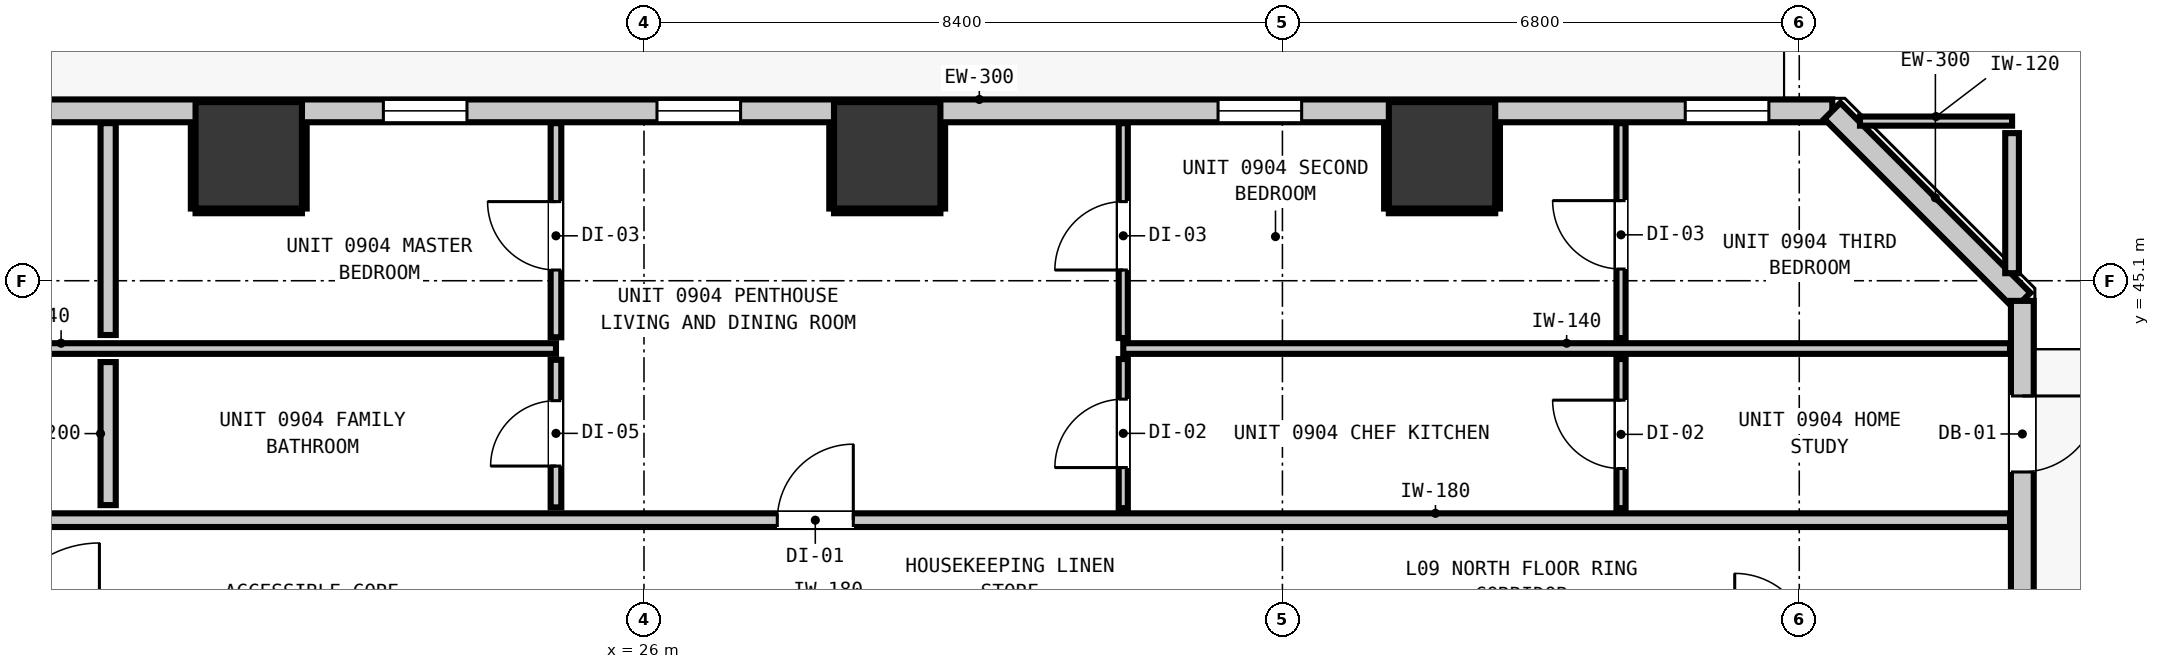
"""IFC4 building model, lengths in metres.
Left out: names, types, materials, properties, quantities, classifications, styles, units other than length and angle.
Written with IfcOpenShell. Run it as: python <this file> out.ifc"""

import sys

from ifc_helpers import new_model, si_unit, direction, frame, frame_2d, origin, origin_2d, place, context, subcontext, project, spatial, rectangle, extrude, element, fill, save


model = new_model("IFC4")
c1 = context("Model", 3, precision=1e-05, world=origin(), true_north=direction((0.0, 1.0)))
c2 = subcontext(c1, "Body", "Model", "MODEL_VIEW")
j1 = project(units=[si_unit("LENGTHUNIT", "METRE"), si_unit("PLANEANGLEUNIT", "RADIAN")], contexts=[c1])
p1 = place(None, origin())
s1 = spatial("IfcSite", under=j1, at=p1, CompositionType="ELEMENT")
p2 = place(p1, origin())
s2 = spatial("IfcBuilding", under=s1, at=p2, CompositionType="ELEMENT")
p3 = place(p2, frame((0.0, 0.0, 35.28)))
s3 = spatial("IfcBuildingStorey", under=s2, at=p3, CompositionType="ELEMENT", Elevation=35.28)
for number, where, z_axis, x_axis in (
    (1, (20.8, 46.75, 0.0), (0.0, 0.0, 1.0), (1.0, 0.0, 0.0)),
    (2, (29.2, 46.75, 0.0), (0.0, 0.0, 1.0), (1.0, 0.0, 0.0)),
    (3, (36.5, 46.75, 0.0), (0.0, 0.0, 1.0), (1.0, 0.0, 0.0)),
):
    element("IfcColumn", number, at=place(p3, frame(where, z_axis=z_axis, x_axis=x_axis)), inside=s3, PredefinedType="COLUMN", context=c2, shape_type="SweptSolid", body=[
        extrude(rectangle(XDim=1.4, YDim=1.4, at=origin_2d()), origin(), (0.0, 0.0, 1.0), 3.32),
    ])
p4 = place(p3, frame((4.165, 47.335, 0.0), z_axis=(0.0, 0.0, 1.0), x_axis=(1.0, 0.0, 0.0)))
e4 = element("IfcWall", 4, at=p4, inside=s3, PredefinedType="STANDARD", context=c2, shape_type="SweptSolid", body=[
    extrude(rectangle(XDim=37.47, YDim=0.3, at=frame_2d((18.735, 0.0))), origin(), (0.0, 0.0, 1.0), 3.06),
])
p5 = place(p4, frame((0.901, 0.0, 0.0)))
e5 = element("IfcOpeningElement", 5, at=p5, cuts=e4, PredefinedType="OPENING", context=c2, shape_type="SweptSolid", body=[
    extrude(rectangle(XDim=1.0, YDim=2.15, at=frame_2d((0.5, 1.075))), frame((0.0, 0.16, 0.0), z_axis=(0.0, -1.0, 0.0), x_axis=(1.0, 0.0, 0.0)), (0.0, 0.0, 1.0), 0.32),
])
p6 = place(p4, frame((4.693, 0.0, 0.85)))
e6 = element("IfcOpeningElement", 6, at=p6, cuts=e4, PredefinedType="OPENING", context=c2, shape_type="SweptSolid", body=[
    extrude(rectangle(XDim=1.1, YDim=2.05, at=frame_2d((0.55, 1.025))), frame((0.0, 0.16, 0.0), z_axis=(0.0, -1.0, 0.0), x_axis=(1.0, 0.0, 0.0)), (0.0, 0.0, 1.0), 0.32),
])
p7 = place(p4, frame((11.845, 0.0, 0.85)))
e7 = element("IfcOpeningElement", 7, at=p7, cuts=e4, PredefinedType="OPENING", context=c2, shape_type="SweptSolid", body=[
    extrude(rectangle(XDim=1.1, YDim=2.05, at=frame_2d((0.55, 1.025))), frame((0.0, 0.16, 0.0), z_axis=(0.0, -1.0, 0.0), x_axis=(1.0, 0.0, 0.0)), (0.0, 0.0, 1.0), 0.32),
])
p8 = place(p4, frame((22.006, 0.0, 0.85)))
e8 = element("IfcOpeningElement", 8, at=p8, cuts=e4, PredefinedType="OPENING", context=c2, shape_type="SweptSolid", body=[
    extrude(rectangle(XDim=1.1, YDim=2.05, at=frame_2d((0.55, 1.025))), frame((0.0, 0.16, 0.0), z_axis=(0.0, -1.0, 0.0), x_axis=(1.0, 0.0, 0.0)), (0.0, 0.0, 1.0), 0.32),
])
p9 = place(p4, frame((18.406, 0.0, 0.85)))
e9 = element("IfcOpeningElement", 9, at=p9, cuts=e4, PredefinedType="OPENING", context=c2, shape_type="SweptSolid", body=[
    extrude(rectangle(XDim=1.1, YDim=2.05, at=frame_2d((0.55, 1.025))), frame((0.0, 0.16, 0.0), z_axis=(0.0, -1.0, 0.0), x_axis=(1.0, 0.0, 0.0)), (0.0, 0.0, 1.0), 0.32),
])
p10 = place(p4, frame((29.388, 0.0, 0.85)))
e10 = element("IfcOpeningElement", 10, at=p10, cuts=e4, PredefinedType="OPENING", context=c2, shape_type="SweptSolid", body=[
    extrude(rectangle(XDim=1.1, YDim=2.05, at=frame_2d((0.55, 1.025))), frame((0.0, 0.16, 0.0), z_axis=(0.0, -1.0, 0.0), x_axis=(1.0, 0.0, 0.0)), (0.0, 0.0, 1.0), 0.32),
])
p11 = place(p4, frame((35.535, 0.0, 0.85)))
e11 = element("IfcOpeningElement", 11, at=p11, cuts=e4, PredefinedType="OPENING", context=c2, shape_type="SweptSolid", body=[
    extrude(rectangle(XDim=1.1, YDim=2.05, at=frame_2d((0.55, 1.025))), frame((0.0, 0.16, 0.0), z_axis=(0.0, -1.0, 0.0), x_axis=(1.0, 0.0, 0.0)), (0.0, 0.0, 1.0), 0.32),
])
p12 = place(p3, frame((41.635, 47.335, 0.0), z_axis=(0.0, 0.0, 1.0), x_axis=(0.707106781187, -0.707106781187, 0.0)))
e12 = element("IfcWall", 12, at=p12, inside=s3, PredefinedType="STANDARD", context=c2, shape_type="SweptSolid", body=[
    extrude(rectangle(XDim=3.536, YDim=0.3, at=frame_2d((1.768, 0.0))), origin(), (0.0, 0.0, 1.0), 3.06),
])
p13 = place(p3, frame((44.135, 44.835, 0.0), z_axis=(0.0, 0.0, 1.0), x_axis=(0.0, -1.0, 0.0)))
e13 = element("IfcWall", 13, at=p13, inside=s3, PredefinedType="STANDARD", context=c2, shape_type="SweptSolid", body=[
    extrude(rectangle(XDim=34.67, YDim=0.3, at=frame_2d((17.335, 0.0))), origin(), (0.0, 0.0, 1.0), 3.06),
])
p14 = place(p13, frame((1.251, 0.0, 0.0)))
e14 = element("IfcOpeningElement", 14, at=p14, cuts=e13, PredefinedType="OPENING", context=c2, shape_type="SweptSolid", body=[
    extrude(rectangle(XDim=1.0, YDim=2.15, at=frame_2d((0.5, 1.075))), frame((0.0, 0.16, 0.0), z_axis=(0.0, -1.0, 0.0), x_axis=(1.0, 0.0, 0.0)), (0.0, 0.0, 1.0), 0.32),
])
p15 = place(p13, frame((32.708, 0.0, 0.85)))
e15 = element("IfcOpeningElement", 15, at=p15, cuts=e13, PredefinedType="OPENING", context=c2, shape_type="SweptSolid", body=[
    extrude(rectangle(XDim=1.1, YDim=2.05, at=frame_2d((0.55, 1.025))), frame((0.0, 0.16, 0.0), z_axis=(0.0, -1.0, 0.0), x_axis=(1.0, 0.0, 0.0)), (0.0, 0.0, 1.0), 0.32),
])
p16 = place(p13, frame((17.935, 0.0, 0.85)))
e16 = element("IfcOpeningElement", 16, at=p16, cuts=e13, PredefinedType="OPENING", context=c2, shape_type="SweptSolid", body=[
    extrude(rectangle(XDim=1.1, YDim=2.05, at=frame_2d((0.55, 1.025))), frame((0.0, 0.16, 0.0), z_axis=(0.0, -1.0, 0.0), x_axis=(1.0, 0.0, 0.0)), (0.0, 0.0, 1.0), 0.32),
])
p17 = place(p13, frame((6.959, 0.0, 0.85)))
e17 = element("IfcOpeningElement", 17, at=p17, cuts=e13, PredefinedType="OPENING", context=c2, shape_type="SweptSolid", body=[
    extrude(rectangle(XDim=1.1, YDim=2.05, at=frame_2d((0.55, 1.025))), frame((0.0, 0.16, 0.0), z_axis=(0.0, -1.0, 0.0), x_axis=(1.0, 0.0, 0.0)), (0.0, 0.0, 1.0), 0.32),
])
p18 = place(p3, frame((12.989, 41.95, 0.0), z_axis=(0.0, 0.0, 1.0), x_axis=(1.0, 0.0, 0.0)))
e18 = element("IfcWall", 18, at=p18, inside=s3, PredefinedType="PARTITIONING", context=c2, shape_type="SweptSolid", body=[
    extrude(rectangle(XDim=30.984, YDim=0.18, at=frame_2d((15.492, 0.0))), origin(), (0.0, 0.0, 1.0), 3.06),
])
p19 = place(p18, frame((14.765, 0.0, 0.0)))
e19 = element("IfcOpeningElement", 19, at=p19, cuts=e18, PredefinedType="OPENING", context=c2, shape_type="SweptSolid", body=[
    extrude(rectangle(XDim=1.0, YDim=2.15, at=frame_2d((0.5, 1.075))), frame((0.0, 0.1, 0.0), z_axis=(0.0, -1.0, 0.0), x_axis=(1.0, 0.0, 0.0)), (0.0, 0.0, 1.0), 0.2),
])
p20 = place(p3, frame((11.82, 44.208, 0.0), z_axis=(0.0, 0.0, 1.0), x_axis=(1.0, 0.0, 0.0)))
e20 = element("IfcWall", 20, at=p20, inside=s3, PredefinedType="PARTITIONING", context=c2, shape_type="SweptSolid", body=[
    extrude(rectangle(XDim=13.022, YDim=0.14, at=frame_2d((6.511, 0.0))), origin(), (0.0, 0.0, 1.0), 3.06),
])
p21 = place(p3, frame((32.306, 44.208, 0.0), z_axis=(0.0, 0.0, 1.0), x_axis=(1.0, 0.0, 0.0)))
e21 = element("IfcWall", 21, at=p21, inside=s3, PredefinedType="PARTITIONING", context=c2, shape_type="SweptSolid", body=[
    extrude(rectangle(XDim=11.667, YDim=0.14, at=frame_2d((5.833, 0.0))), origin(), (0.0, 0.0, 1.0), 3.06),
])
p22 = place(p3, frame((41.999, 47.2, 0.0), z_axis=(0.0, 0.0, 1.0), x_axis=(1.0, 0.0, 0.0)))
e22 = element("IfcWall", 22, at=p22, inside=s3, PredefinedType="PARTITIONING", context=c2, shape_type="SweptSolid", body=[
    extrude(rectangle(XDim=2.001, YDim=0.12, at=frame_2d((1.0, 0.0))), origin(), (0.0, 0.0, 1.0), 3.06),
])
p23 = place(p3, frame((18.95, 42.148, 0.0), z_axis=(0.0, 0.0, 1.0), x_axis=(0.0, 1.0, 0.0)))
e23 = element("IfcWall", 23, at=p23, inside=s3, PredefinedType="PARTITIONING", context=c2, shape_type="SweptSolid", body=[
    extrude(rectangle(XDim=1.882, YDim=0.2, at=frame_2d((0.941, 0.0))), origin(), (0.0, 0.0, 1.0), 3.06),
])
p24 = place(p3, frame((18.95, 44.386, 0.0), z_axis=(0.0, 0.0, 1.0), x_axis=(0.0, 1.0, 0.0)))
e24 = element("IfcWall", 24, at=p24, inside=s3, PredefinedType="PARTITIONING", context=c2, shape_type="SweptSolid", body=[
    extrude(rectangle(XDim=2.787, YDim=0.2, at=frame_2d((1.394, 0.0))), origin(), (0.0, 0.0, 1.0), 3.06),
])
p25 = place(p3, frame((44.0, 45.199, 0.0), z_axis=(0.0, 0.0, 1.0), x_axis=(0.0, 1.0, 0.0)))
e25 = element("IfcWall", 25, at=p25, inside=s3, PredefinedType="PARTITIONING", context=c2, shape_type="SweptSolid", body=[
    extrude(rectangle(XDim=1.843, YDim=0.18, at=frame_2d((0.921, 0.0))), origin(), (0.0, 0.0, 1.0), 3.06),
])
p26 = place(p3, frame((24.842, 42.118, 0.0), z_axis=(0.0, 0.0, 1.0), x_axis=(0.0, 1.0, 0.0)))
e26 = element("IfcWall", 26, at=p26, inside=s3, PredefinedType="PARTITIONING", context=c2, shape_type="SweptSolid", body=[
    extrude(rectangle(XDim=1.942, YDim=0.14, at=frame_2d((0.971, 0.0))), origin(), (0.0, 0.0, 1.0), 3.06),
])
p27 = place(p26, frame((0.544, 0.0, 0.0)))
e27 = element("IfcOpeningElement", 27, at=p27, cuts=e26, PredefinedType="OPENING", context=c2, shape_type="SweptSolid", body=[
    extrude(rectangle(XDim=0.86, YDim=2.02, at=frame_2d((0.43, 1.01))), frame((0.0, 0.08, 0.0), z_axis=(0.0, -1.0, 0.0), x_axis=(1.0, 0.0, 0.0)), (0.0, 0.0, 1.0), 0.16),
])
p28 = place(p3, frame((24.842, 44.356, 0.0), z_axis=(0.0, 0.0, 1.0), x_axis=(0.0, 1.0, 0.0)))
e28 = element("IfcWall", 28, at=p28, inside=s3, PredefinedType="PARTITIONING", context=c2, shape_type="SweptSolid", body=[
    extrude(rectangle(XDim=2.817, YDim=0.14, at=frame_2d((1.409, 0.0))), origin(), (0.0, 0.0, 1.0), 3.06),
])
p29 = place(p28, frame((0.885, 0.0, 0.0)))
e29 = element("IfcOpeningElement", 29, at=p29, cuts=e28, PredefinedType="OPENING", context=c2, shape_type="SweptSolid", body=[
    extrude(rectangle(XDim=0.9, YDim=2.1, at=frame_2d((0.45, 1.05))), frame((0.0, 0.08, 0.0), z_axis=(0.0, -1.0, 0.0), x_axis=(1.0, 0.0, 0.0)), (0.0, 0.0, 1.0), 0.16),
])
p30 = place(p3, frame((32.306, 42.108, 0.0), z_axis=(0.0, 0.0, 1.0), x_axis=(0.0, 1.0, 0.0)))
e30 = element("IfcWall", 30, at=p30, inside=s3, PredefinedType="PARTITIONING", context=c2, shape_type="SweptSolid", body=[
    extrude(rectangle(XDim=1.962, YDim=0.12, at=frame_2d((0.981, 0.0))), origin(), (0.0, 0.0, 1.0), 3.06),
])
p31 = place(p30, frame((0.534, 0.0, 0.0)))
e31 = element("IfcOpeningElement", 31, at=p31, cuts=e30, PredefinedType="OPENING", context=c2, shape_type="SweptSolid", body=[
    extrude(rectangle(XDim=0.9, YDim=2.1, at=frame_2d((0.45, 1.05))), frame((0.0, 0.07, 0.0), z_axis=(0.0, -1.0, 0.0), x_axis=(1.0, 0.0, 0.0)), (0.0, 0.0, 1.0), 0.14),
])
p32 = place(p3, frame((32.306, 44.346, 0.0), z_axis=(0.0, 0.0, 1.0), x_axis=(0.0, 1.0, 0.0)))
e32 = element("IfcWall", 32, at=p32, inside=s3, PredefinedType="PARTITIONING", context=c2, shape_type="SweptSolid", body=[
    extrude(rectangle(XDim=2.827, YDim=0.12, at=frame_2d((1.414, 0.0))), origin(), (0.0, 0.0, 1.0), 3.06),
])
p33 = place(p32, frame((0.895, 0.0, 0.0)))
e33 = element("IfcOpeningElement", 33, at=p33, cuts=e32, PredefinedType="OPENING", context=c2, shape_type="SweptSolid", body=[
    extrude(rectangle(XDim=0.9, YDim=2.1, at=frame_2d((0.45, 1.05))), frame((0.0, 0.07, 0.0), z_axis=(0.0, -1.0, 0.0), x_axis=(1.0, 0.0, 0.0)), (0.0, 0.0, 1.0), 0.14),
])
p34 = place(p3, frame((38.855, 42.108, 0.0), z_axis=(0.0, 0.0, 1.0), x_axis=(0.0, 1.0, 0.0)))
e34 = element("IfcWall", 34, at=p34, inside=s3, PredefinedType="PARTITIONING", context=c2, shape_type="SweptSolid", body=[
    extrude(rectangle(XDim=1.962, YDim=0.12, at=frame_2d((0.981, 0.0))), origin(), (0.0, 0.0, 1.0), 3.06),
])
p35 = place(p34, frame((0.521, 0.0, 0.0)))
e35 = element("IfcOpeningElement", 35, at=p35, cuts=e34, PredefinedType="OPENING", context=c2, shape_type="SweptSolid", body=[
    extrude(rectangle(XDim=0.9, YDim=2.1, at=frame_2d((0.45, 1.05))), frame((0.0, 0.07, 0.0), z_axis=(0.0, -1.0, 0.0), x_axis=(1.0, 0.0, 0.0)), (0.0, 0.0, 1.0), 0.14),
])
p36 = place(p3, frame((38.855, 44.346, 0.0), z_axis=(0.0, 0.0, 1.0), x_axis=(0.0, 1.0, 0.0)))
e36 = element("IfcWall", 36, at=p36, inside=s3, PredefinedType="PARTITIONING", context=c2, shape_type="SweptSolid", body=[
    extrude(rectangle(XDim=2.827, YDim=0.12, at=frame_2d((1.414, 0.0))), origin(), (0.0, 0.0, 1.0), 3.06),
])
p37 = place(p36, frame((0.908, 0.0, 0.0)))
e37 = element("IfcOpeningElement", 37, at=p37, cuts=e36, PredefinedType="OPENING", context=c2, shape_type="SweptSolid", body=[
    extrude(rectangle(XDim=0.9, YDim=2.1, at=frame_2d((0.45, 1.05))), frame((0.0, 0.07, 0.0), z_axis=(0.0, -1.0, 0.0), x_axis=(1.0, 0.0, 0.0)), (0.0, 0.0, 1.0), 0.14),
])
p38 = place(p3, frame((20.1, 46.018, 0.0), z_axis=(0.0, 0.0, 1.0), x_axis=(1.0, 0.0, 0.0)))
e38 = element("IfcWall", 38, at=p38, inside=s3, PredefinedType="PARTITIONING", context=c2, shape_type="SweptSolid", body=[
    extrude(rectangle(XDim=1.4, YDim=0.06, at=frame_2d((0.7, 0.0))), origin(), (0.0, 0.0, 1.0), 1.45),
])
for number, where, z_axis, x_axis in (
    (39, (20.068, 46.05, 0.0), (0.0, 0.0, 1.0), (0.0, 1.0, 0.0)),
    (40, (21.532, 46.05, 0.0), (0.0, 0.0, 1.0), (0.0, 1.0, 0.0)),
):
    element("IfcWall", number, at=place(p3, frame(where, z_axis=z_axis, x_axis=x_axis)), inside=s3, PredefinedType="PARTITIONING", context=c2, shape_type="SweptSolid", body=[
        extrude(rectangle(XDim=1.12, YDim=0.06, at=frame_2d((0.56, 0.0))), origin(), (0.0, 0.0, 1.0), 1.45),
    ])
p39 = place(p3, frame((28.5, 46.018, 0.0), z_axis=(0.0, 0.0, 1.0), x_axis=(1.0, 0.0, 0.0)))
e41 = element("IfcWall", 41, at=p39, inside=s3, PredefinedType="PARTITIONING", context=c2, shape_type="SweptSolid", body=[
    extrude(rectangle(XDim=1.4, YDim=0.06, at=frame_2d((0.7, 0.0))), origin(), (0.0, 0.0, 1.0), 1.45),
])
for number, where, z_axis, x_axis in (
    (42, (28.468, 46.05, 0.0), (0.0, 0.0, 1.0), (0.0, 1.0, 0.0)),
    (43, (29.932, 46.05, 0.0), (0.0, 0.0, 1.0), (0.0, 1.0, 0.0)),
):
    element("IfcWall", number, at=place(p3, frame(where, z_axis=z_axis, x_axis=x_axis)), inside=s3, PredefinedType="PARTITIONING", context=c2, shape_type="SweptSolid", body=[
        extrude(rectangle(XDim=1.12, YDim=0.06, at=frame_2d((0.56, 0.0))), origin(), (0.0, 0.0, 1.0), 1.45),
    ])
p40 = place(p3, frame((35.8, 46.018, 0.0), z_axis=(0.0, 0.0, 1.0), x_axis=(1.0, 0.0, 0.0)))
e44 = element("IfcWall", 44, at=p40, inside=s3, PredefinedType="PARTITIONING", context=c2, shape_type="SweptSolid", body=[
    extrude(rectangle(XDim=1.4, YDim=0.06, at=frame_2d((0.7, 0.0))), origin(), (0.0, 0.0, 1.0), 1.45),
])
for number, where, z_axis, x_axis in (
    (45, (35.768, 46.05, 0.0), (0.0, 0.0, 1.0), (0.0, 1.0, 0.0)),
    (46, (37.232, 46.05, 0.0), (0.0, 0.0, 1.0), (0.0, 1.0, 0.0)),
):
    element("IfcWall", number, at=place(p3, frame(where, z_axis=z_axis, x_axis=x_axis)), inside=s3, PredefinedType="PARTITIONING", context=c2, shape_type="SweptSolid", body=[
        extrude(rectangle(XDim=1.12, YDim=0.06, at=frame_2d((0.56, 0.0))), origin(), (0.0, 0.0, 1.0), 1.45),
    ])
p41 = place(p14, origin())
e47 = element("IfcDoor", 47, at=p41, inside=s3, OperationType="SINGLE_SWING_LEFT", PredefinedType="DOOR", context=c2, shape_type="SweptSolid", body=[
    extrude(rectangle(XDim=1.0, YDim=2.15, at=frame_2d((0.5, 1.075))), frame((0.0, 0.025, 0.0), z_axis=(0.0, -1.0, 0.0), x_axis=(1.0, 0.0, 0.0)), (0.0, 0.0, 1.0), 0.05),
])
fill(e14, e47)
p42 = place(p8, origin())
e48 = element("IfcWindow", 48, at=p42, inside=s3, PartitioningType="SINGLE_PANEL", PredefinedType="WINDOW", context=c2, shape_type="SweptSolid", body=[
    extrude(rectangle(XDim=1.1, YDim=2.05, at=frame_2d((0.55, 1.025))), frame((0.0, 0.03, 0.0), z_axis=(0.0, -1.0, 0.0), x_axis=(1.0, 0.0, 0.0)), (0.0, 0.0, 1.0), 0.06),
])
fill(e8, e48)
p43 = place(p9, origin())
e49 = element("IfcWindow", 49, at=p43, inside=s3, PartitioningType="SINGLE_PANEL", PredefinedType="WINDOW", context=c2, shape_type="SweptSolid", body=[
    extrude(rectangle(XDim=1.1, YDim=2.05, at=frame_2d((0.55, 1.025))), frame((0.0, 0.03, 0.0), z_axis=(0.0, -1.0, 0.0), x_axis=(1.0, 0.0, 0.0)), (0.0, 0.0, 1.0), 0.06),
])
fill(e9, e49)
p44 = place(p10, origin())
e50 = element("IfcWindow", 50, at=p44, inside=s3, PartitioningType="SINGLE_PANEL", PredefinedType="WINDOW", context=c2, shape_type="SweptSolid", body=[
    extrude(rectangle(XDim=1.1, YDim=2.05, at=frame_2d((0.55, 1.025))), frame((0.0, 0.03, 0.0), z_axis=(0.0, -1.0, 0.0), x_axis=(1.0, 0.0, 0.0)), (0.0, 0.0, 1.0), 0.06),
])
fill(e10, e50)
p45 = place(p11, origin())
e51 = element("IfcWindow", 51, at=p45, inside=s3, PartitioningType="SINGLE_PANEL", PredefinedType="WINDOW", context=c2, shape_type="SweptSolid", body=[
    extrude(rectangle(XDim=1.1, YDim=2.05, at=frame_2d((0.55, 1.025))), frame((0.0, 0.03, 0.0), z_axis=(0.0, -1.0, 0.0), x_axis=(1.0, 0.0, 0.0)), (0.0, 0.0, 1.0), 0.06),
])
fill(e11, e51)
p46 = place(p19, origin())
e52 = element("IfcDoor", 52, at=p46, inside=s3, OperationType="SINGLE_SWING_RIGHT", PredefinedType="DOOR", context=c2, shape_type="SweptSolid", body=[
    extrude(rectangle(XDim=1.0, YDim=2.15, at=frame_2d((0.5, 1.075))), frame((0.0, 0.025, 0.0), z_axis=(0.0, -1.0, 0.0), x_axis=(1.0, 0.0, 0.0)), (0.0, 0.0, 1.0), 0.05),
])
fill(e19, e52)
p47 = place(p27, origin())
e53 = element("IfcDoor", 53, at=p47, inside=s3, OperationType="SINGLE_SWING_LEFT", PredefinedType="DOOR", context=c2, shape_type="SweptSolid", body=[
    extrude(rectangle(XDim=0.86, YDim=2.02, at=frame_2d((0.43, 1.01))), frame((0.0, 0.025, 0.0), z_axis=(0.0, -1.0, 0.0), x_axis=(1.0, 0.0, 0.0)), (0.0, 0.0, 1.0), 0.05),
])
fill(e27, e53)
p48 = place(p29, origin())
e54 = element("IfcDoor", 54, at=p48, inside=s3, OperationType="SINGLE_SWING_RIGHT", PredefinedType="DOOR", context=c2, shape_type="SweptSolid", body=[
    extrude(rectangle(XDim=0.9, YDim=2.1, at=frame_2d((0.45, 1.05))), frame((0.0, 0.025, 0.0), z_axis=(0.0, -1.0, 0.0), x_axis=(1.0, 0.0, 0.0)), (0.0, 0.0, 1.0), 0.05),
])
fill(e29, e54)
p49 = place(p31, origin())
e55 = element("IfcDoor", 55, at=p49, inside=s3, OperationType="SINGLE_SWING_LEFT", PredefinedType="DOOR", context=c2, shape_type="SweptSolid", body=[
    extrude(rectangle(XDim=0.9, YDim=2.1, at=frame_2d((0.45, 1.05))), frame((0.0, 0.025, 0.0), z_axis=(0.0, -1.0, 0.0), x_axis=(1.0, 0.0, 0.0)), (0.0, 0.0, 1.0), 0.05),
])
fill(e31, e55)
p50 = place(p35, origin())
e56 = element("IfcDoor", 56, at=p50, inside=s3, OperationType="SINGLE_SWING_RIGHT", PredefinedType="DOOR", context=c2, shape_type="SweptSolid", body=[
    extrude(rectangle(XDim=0.9, YDim=2.1, at=frame_2d((0.45, 1.05))), frame((0.0, 0.025, 0.0), z_axis=(0.0, -1.0, 0.0), x_axis=(1.0, 0.0, 0.0)), (0.0, 0.0, 1.0), 0.05),
])
fill(e35, e56)
p51 = place(p33, origin())
e57 = element("IfcDoor", 57, at=p51, inside=s3, OperationType="SINGLE_SWING_LEFT", PredefinedType="DOOR", context=c2, shape_type="SweptSolid", body=[
    extrude(rectangle(XDim=0.9, YDim=2.1, at=frame_2d((0.45, 1.05))), frame((0.0, 0.025, 0.0), z_axis=(0.0, -1.0, 0.0), x_axis=(1.0, 0.0, 0.0)), (0.0, 0.0, 1.0), 0.05),
])
fill(e33, e57)
p52 = place(p37, origin())
e58 = element("IfcDoor", 58, at=p52, inside=s3, OperationType="SINGLE_SWING_RIGHT", PredefinedType="DOOR", context=c2, shape_type="SweptSolid", body=[
    extrude(rectangle(XDim=0.9, YDim=2.1, at=frame_2d((0.45, 1.05))), frame((0.0, 0.025, 0.0), z_axis=(0.0, -1.0, 0.0), x_axis=(1.0, 0.0, 0.0)), (0.0, 0.0, 1.0), 0.05),
])
fill(e37, e58)
save(model, sys.argv[1])
